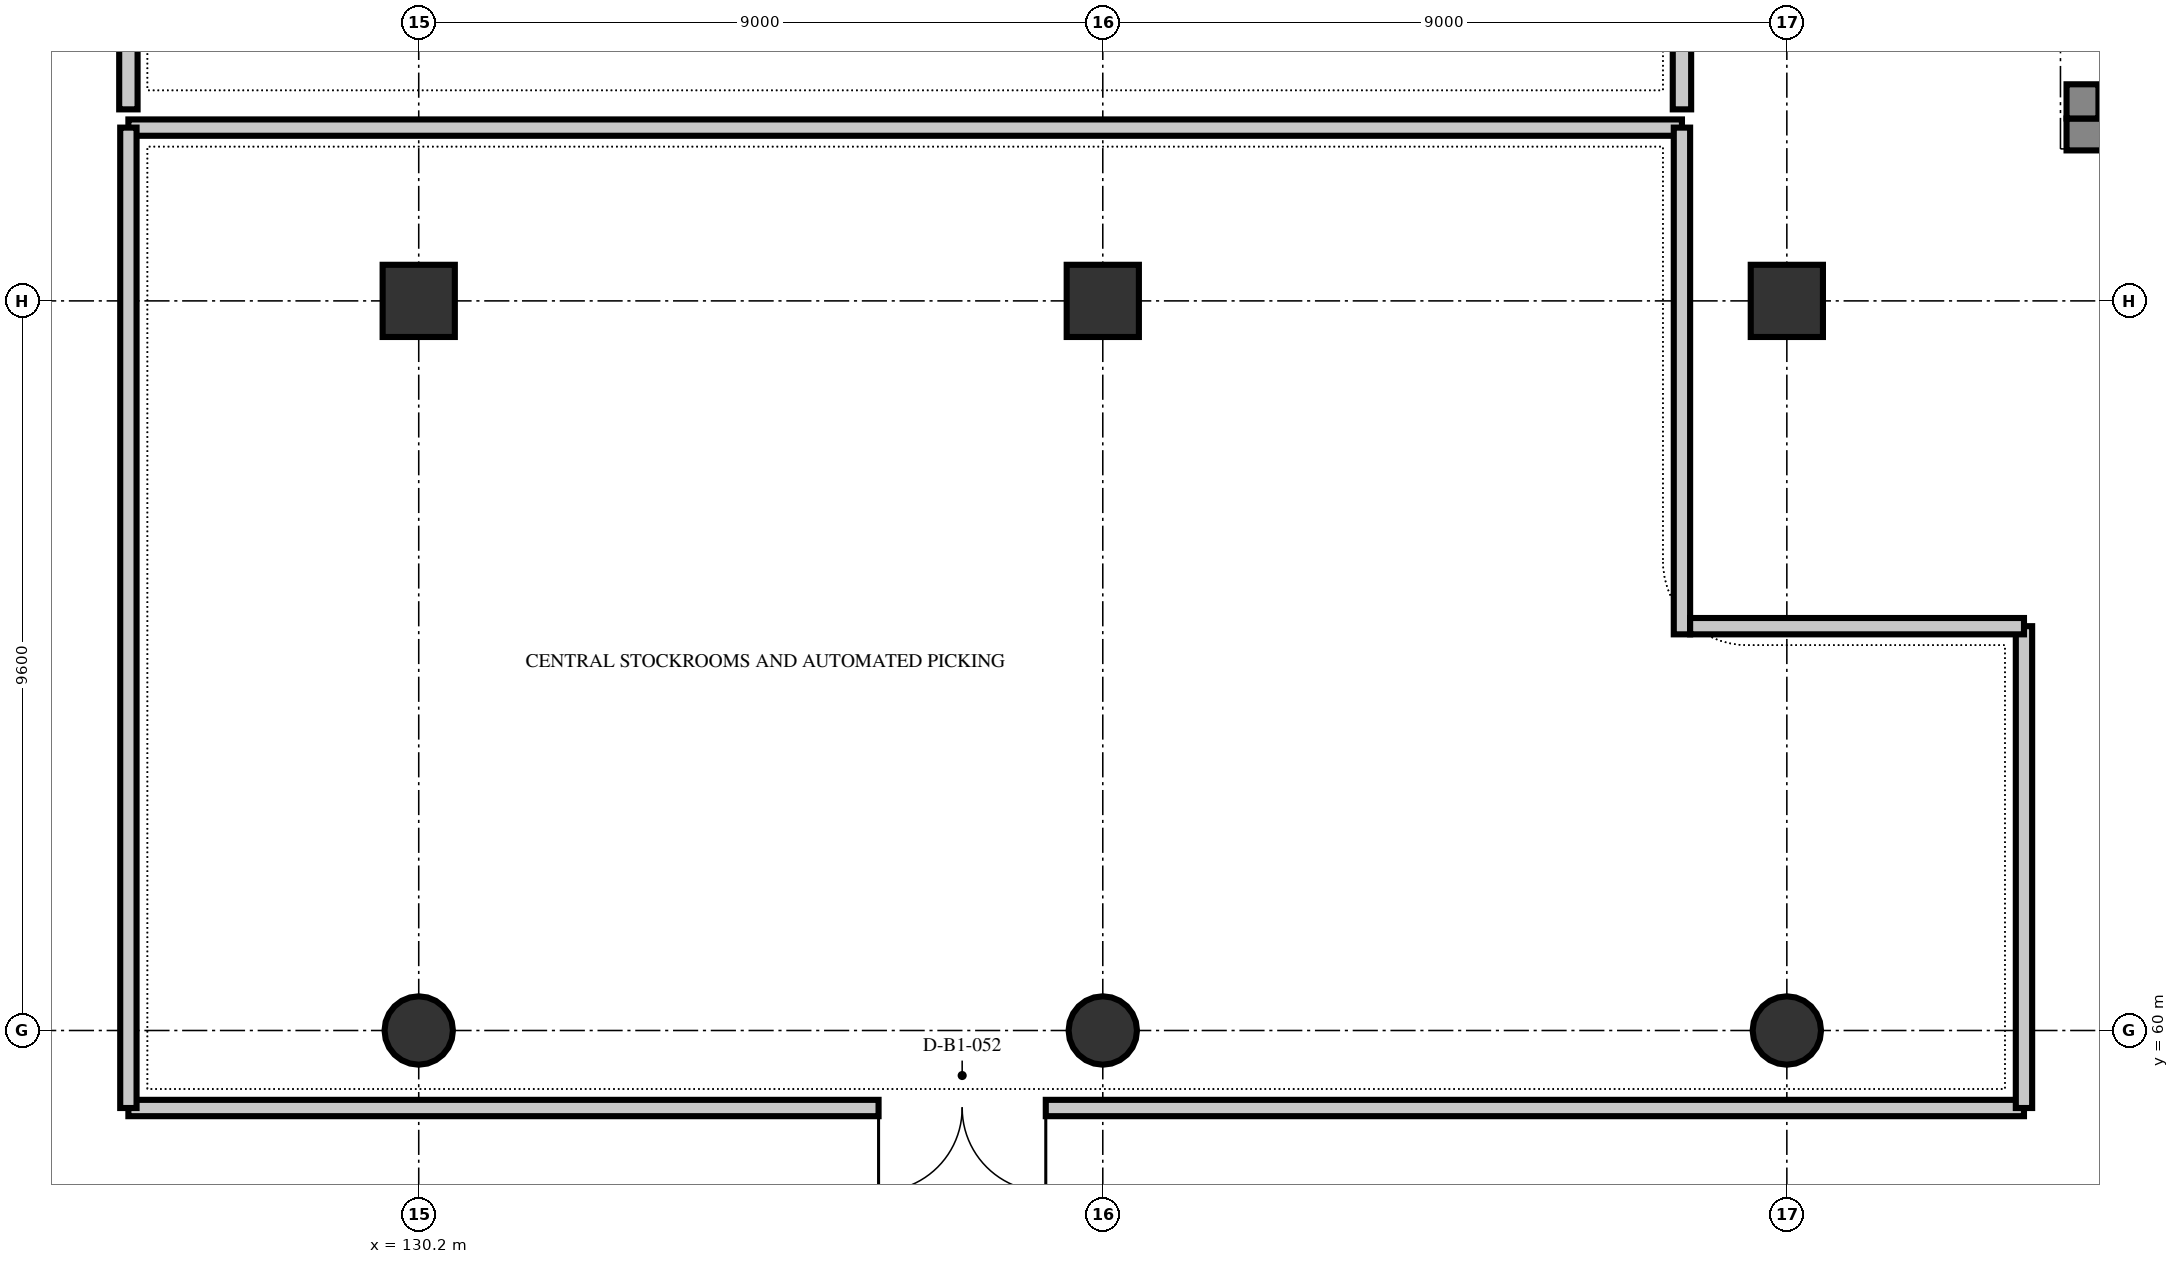
"""IFC4 building model, lengths in metres.
Left out: names, types, materials, properties, quantities, classifications, styles, units other than length and angle.
Written with IfcOpenShell. Run it as: python <this file> out.ifc"""

import sys

from ifc_helpers import new_model, si_unit, direction, frame, frame_2d, origin, origin_2d, place, context, subcontext, project, spatial, rectangle, circle, extrude, element, fill, save


model = new_model("IFC4")
c1 = context("Model", 3, precision=1e-05, world=origin(), true_north=direction((0.0, 1.0)))
c2 = subcontext(c1, "Body", "Model", "MODEL_VIEW")
j1 = project(units=[si_unit("LENGTHUNIT", "METRE"), si_unit("PLANEANGLEUNIT", "RADIAN")], contexts=[c1])
p1 = place(None, origin())
s1 = spatial("IfcSite", under=j1, at=p1, CompositionType="ELEMENT")
p2 = place(p1, origin())
s2 = spatial("IfcBuilding", under=s1, at=p2, CompositionType="ELEMENT")
p3 = place(p2, frame((0.0, 0.0, -4.8)))
s3 = spatial("IfcBuildingStorey", under=s2, at=p3, CompositionType="ELEMENT", Elevation=-4.8)
p4 = place(p3, frame((130.2, 60.0, 0.0), z_axis=(0.0, 0.0, 1.0), x_axis=(1.0, 0.0, 0.0)))
e1 = element("IfcColumn", 1, at=p4, inside=s3, PredefinedType="COLUMN", context=c2, shape_type="SweptSolid", body=[
    extrude(circle(Radius=0.45, at=origin_2d()), origin(), (0.0, 0.0, 1.0), 4.8),
])
p5 = place(p3, frame((130.2, 69.6, 0.0), z_axis=(0.0, 0.0, 1.0), x_axis=(1.0, 0.0, 0.0)))
e2 = element("IfcColumn", 2, at=p5, inside=s3, PredefinedType="COLUMN", context=c2, shape_type="SweptSolid", body=[
    extrude(rectangle(XDim=0.95, YDim=0.95, at=origin_2d()), origin(), (0.0, 0.0, 1.0), 4.8),
])
p6 = place(p3, frame((139.2, 60.0, 0.0), z_axis=(0.0, 0.0, 1.0), x_axis=(1.0, 0.0, 0.0)))
e3 = element("IfcColumn", 3, at=p6, inside=s3, PredefinedType="COLUMN", context=c2, shape_type="SweptSolid", body=[
    extrude(circle(Radius=0.45, at=origin_2d()), origin(), (0.0, 0.0, 1.0), 4.8),
])
p7 = place(p3, frame((139.2, 69.6, 0.0), z_axis=(0.0, 0.0, 1.0), x_axis=(1.0, 0.0, 0.0)))
e4 = element("IfcColumn", 4, at=p7, inside=s3, PredefinedType="COLUMN", context=c2, shape_type="SweptSolid", body=[
    extrude(rectangle(XDim=0.95, YDim=0.95, at=origin_2d()), origin(), (0.0, 0.0, 1.0), 4.8),
])
p8 = place(p3, frame((148.2, 60.0, 0.0), z_axis=(0.0, 0.0, 1.0), x_axis=(1.0, 0.0, 0.0)))
e5 = element("IfcColumn", 5, at=p8, inside=s3, PredefinedType="COLUMN", context=c2, shape_type="SweptSolid", body=[
    extrude(circle(Radius=0.45, at=origin_2d()), origin(), (0.0, 0.0, 1.0), 4.8),
])
p9 = place(p3, frame((148.2, 69.6, 0.0), z_axis=(0.0, 0.0, 1.0), x_axis=(1.0, 0.0, 0.0)))
e6 = element("IfcColumn", 6, at=p9, inside=s3, PredefinedType="COLUMN", context=c2, shape_type="SweptSolid", body=[
    extrude(rectangle(XDim=0.95, YDim=0.95, at=origin_2d()), origin(), (0.0, 0.0, 1.0), 4.8),
])
p10 = place(p3, frame((151.88, 71.79, 0.0), z_axis=(0.0, 0.0, 1.0), x_axis=(1.0, 0.0, 0.0)))
e7 = element("IfcWall", 7, at=p10, inside=s3, PredefinedType="SHEAR", context=c2, shape_type="SweptSolid", body=[
    extrude(rectangle(XDim=4.94, YDim=0.42, at=frame_2d((2.47, 0.0))), origin(), (0.0, 0.0, 1.0), 4.5),
])
p11 = place(p3, frame((152.09, 72.0, 0.0), z_axis=(0.0, 0.0, 1.0), x_axis=(0.0, 1.0, 0.0)))
e8 = element("IfcWall", 8, at=p11, inside=s3, PredefinedType="SHEAR", context=c2, shape_type="SweptSolid", body=[
    extrude(rectangle(XDim=8.8, YDim=0.42, at=frame_2d((4.4, 0.0))), origin(), (0.0, 0.0, 1.0), 4.5),
])
p12 = place(p11, frame((0.45, 0.0, 0.0)))
e9 = element("IfcOpeningElement", 9, at=p12, cuts=e8, PredefinedType="OPENING", context=c2, shape_type="SweptSolid", body=[
    extrude(rectangle(XDim=1.25, YDim=2.2, at=frame_2d((0.625, 1.1))), frame((0.0, 0.222, 0.0), z_axis=(0.0, -1.0, 0.0), x_axis=(1.0, 0.0, 0.0)), (0.0, 0.0, 1.0), 0.444),
])
p13 = place(p3, frame((151.32, 58.98, 0.0), z_axis=(0.0, 0.0, 1.0), x_axis=(-1.0, 0.0, 0.0)))
e10 = element("IfcWall", 10, at=p13, inside=s3, PredefinedType="PARTITIONING", context=c2, shape_type="SweptSolid", body=[
    extrude(rectangle(XDim=24.94, YDim=0.215, at=frame_2d((12.47, 0.0))), origin(), (0.0, 0.0, 1.0), 4.5),
])
p14 = place(p13, frame((12.87, 0.0, 0.0)))
e11 = element("IfcOpeningElement", 11, at=p14, cuts=e10, PredefinedType="OPENING", context=c2, shape_type="SweptSolid", body=[
    extrude(rectangle(XDim=2.2, YDim=2.5, at=frame_2d((1.1, 1.25))), frame((0.0, 0.12, 0.0), z_axis=(0.0, -1.0, 0.0), x_axis=(1.0, 0.0, 0.0)), (0.0, 0.0, 1.0), 0.239),
])
p15 = place(p3, frame((126.38, 71.88, 0.0), z_axis=(0.0, 0.0, 1.0), x_axis=(1.0, 0.0, 0.0)))
e12 = element("IfcWall", 12, at=p15, inside=s3, PredefinedType="PARTITIONING", context=c2, shape_type="SweptSolid", body=[
    extrude(rectangle(XDim=20.44, YDim=0.215, at=frame_2d((10.22, 0.0))), origin(), (0.0, 0.0, 1.0), 3.44),
])
p16 = place(p3, frame((126.38, 58.98, 0.0), z_axis=(0.0, 0.0, 1.0), x_axis=(0.0, 1.0, 0.0)))
e13 = element("IfcWall", 13, at=p16, inside=s3, PredefinedType="PARTITIONING", context=c2, shape_type="SweptSolid", body=[
    extrude(rectangle(XDim=12.9, YDim=0.215, at=frame_2d((6.45, 0.0))), origin(), (0.0, 0.0, 1.0), 3.44),
])
p17 = place(p3, frame((151.32, 65.32, 0.0), z_axis=(0.0, 0.0, 1.0), x_axis=(0.0, -1.0, 0.0)))
e14 = element("IfcWall", 14, at=p17, inside=s3, PredefinedType="PARTITIONING", context=c2, shape_type="SweptSolid", body=[
    extrude(rectangle(XDim=6.34, YDim=0.215, at=frame_2d((3.17, 0.0))), origin(), (0.0, 0.0, 1.0), 3.44),
])
p18 = place(p3, frame((146.82, 71.88, 0.0), z_axis=(0.0, 0.0, 1.0), x_axis=(0.0, -1.0, 0.0)))
e15 = element("IfcWall", 15, at=p18, inside=s3, PredefinedType="PARTITIONING", context=c2, shape_type="SweptSolid", body=[
    extrude(rectangle(XDim=6.667, YDim=0.215, at=frame_2d((3.334, 0.0))), origin(), (0.0, 0.0, 1.0), 3.44),
])
p19 = place(p3, frame((146.927, 65.32, 0.0), z_axis=(0.0, 0.0, 1.0), x_axis=(1.0, 0.0, 0.0)))
e16 = element("IfcWall", 16, at=p19, inside=s3, PredefinedType="PARTITIONING", context=c2, shape_type="SweptSolid", body=[
    extrude(rectangle(XDim=4.393, YDim=0.215, at=frame_2d((2.196, 0.0))), origin(), (0.0, 0.0, 1.0), 3.44),
])
p20 = place(p3, frame((126.38, 72.12, 0.0), z_axis=(0.0, 0.0, 1.0), x_axis=(0.0, 1.0, 0.0)))
e17 = element("IfcWall", 17, at=p20, inside=s3, PredefinedType="PARTITIONING", context=c2, shape_type="SweptSolid", body=[
    extrude(rectangle(XDim=8.381, YDim=0.242, at=frame_2d((4.19, 0.0))), origin(), (0.0, 0.0, 1.0), 3.44),
])
p21 = place(p3, frame((146.82, 76.02, 0.0), z_axis=(0.0, 0.0, 1.0), x_axis=(0.0, -1.0, 0.0)))
e18 = element("IfcWall", 18, at=p21, inside=s3, PredefinedType="PARTITIONING", context=c2, shape_type="SweptSolid", body=[
    extrude(rectangle(XDim=3.9, YDim=0.242, at=frame_2d((1.95, 0.0))), origin(), (0.0, 0.0, 1.0), 4.5),
])
p22 = place(p12, frame((1.25, 0.0, 0.0), z_axis=(0.0, 0.0, 1.0), x_axis=(-1.0, 0.0, 0.0)))
e19 = element("IfcDoor", 19, at=p22, inside=s3, OperationType="SINGLE_SWING_RIGHT", PredefinedType="DOOR", context=c2, shape_type="SweptSolid", body=[
    extrude(rectangle(XDim=1.25, YDim=2.2, at=frame_2d((0.625, 1.1))), frame((0.0, 0.025, 0.0), z_axis=(0.0, -1.0, 0.0), x_axis=(1.0, 0.0, 0.0)), (0.0, 0.0, 1.0), 0.05),
])
fill(e9, e19)
p23 = place(p14, origin())
e20 = element("IfcDoor", 20, at=p23, inside=s3, OperationType="DOUBLE_DOOR_SINGLE_SWING", PredefinedType="DOOR", context=c2, shape_type="SweptSolid", body=[
    extrude(rectangle(XDim=2.2, YDim=2.5, at=frame_2d((1.1, 1.25))), frame((0.0, 0.025, 0.0), z_axis=(0.0, -1.0, 0.0), x_axis=(1.0, 0.0, 0.0)), (0.0, 0.0, 1.0), 0.05),
])
fill(e11, e20)
save(model, sys.argv[1])
